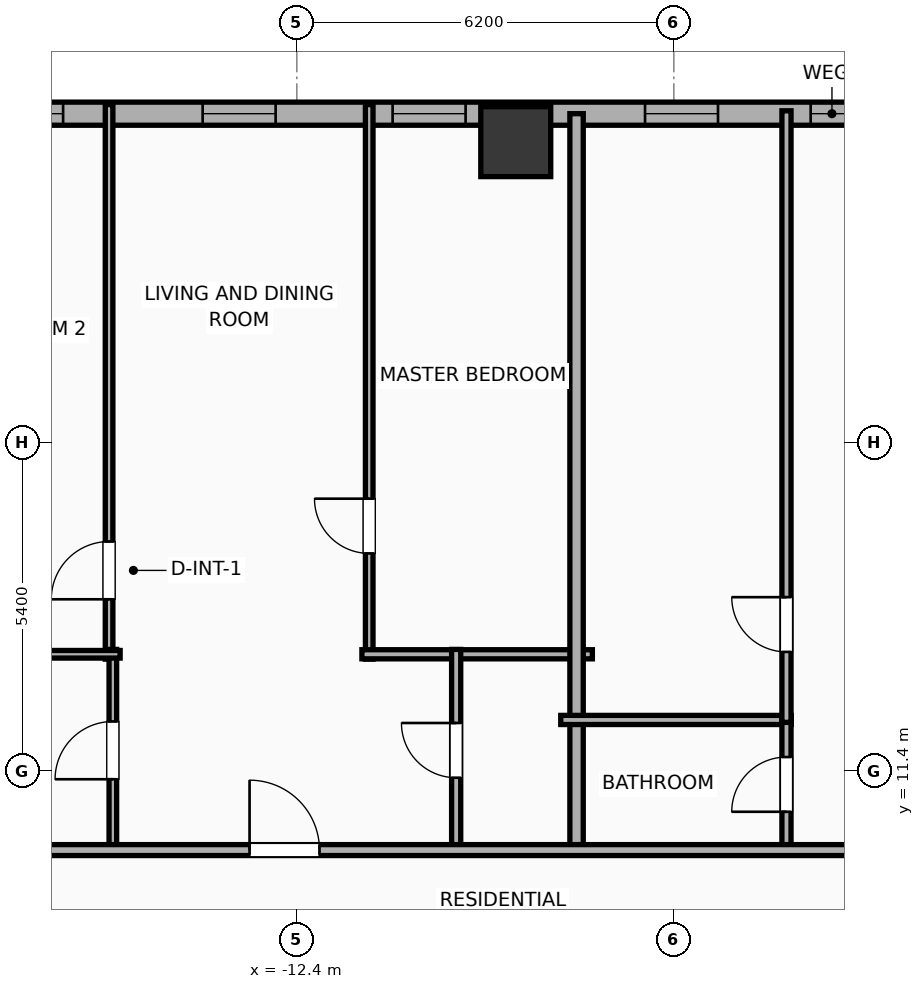
"""IFC4 building model, lengths in metres.
Left out: names, types, materials, properties, quantities, classifications, styles, units other than length and angle.
Written with IfcOpenShell. Run it as: python <this file> out.ifc"""

import sys

from ifc_helpers import new_model, si_unit, direction, frame, frame_2d, origin, origin_2d, place, context, subcontext, project, spatial, rectangle, hollow_rectangle, extrude, element, fill, save


model = new_model("IFC4")
c1 = context("Model", 3, precision=1e-05, world=origin(), true_north=direction((0.0, 1.0)))
c2 = subcontext(c1, "Body", "Model", "MODEL_VIEW")
j1 = project(units=[si_unit("LENGTHUNIT", "METRE"), si_unit("PLANEANGLEUNIT", "RADIAN")], contexts=[c1])
p1 = place(None, origin())
s1 = spatial("IfcSite", under=j1, at=p1, CompositionType="ELEMENT")
p2 = place(p1, origin())
s2 = spatial("IfcBuilding", under=s1, at=p2, CompositionType="ELEMENT")
p3 = place(p2, frame((0.0, 0.0, 45.5)))
s3 = spatial("IfcBuildingStorey", under=s2, at=p3, CompositionType="ELEMENT", Elevation=45.5)
p4 = place(p3, frame((-8.8, 21.75, 0.0), z_axis=(0.0, 0.0, 1.0), x_axis=(1.0, 0.0, 0.0)))
e1 = element("IfcColumn", 1, at=p4, inside=s3, PredefinedType="COLUMN", context=c2, shape_type="SweptSolid", body=[
    extrude(hollow_rectangle(XDim=1.15, YDim=1.15, WallThickness=0.04, at=origin_2d()), origin(), (0.0, 0.0, 1.0), 3.9),
])
p5 = place(p3, frame((-29.581, 22.21, 0.0), z_axis=(0.0, 0.0, 1.0), x_axis=(1.0, 0.0, 0.0)))
e2 = element("IfcWall", 2, at=p5, inside=s3, PredefinedType="ELEMENTEDWALL", context=c2, shape_type="SweptSolid", body=[
    extrude(rectangle(XDim=51.963, YDim=0.38, at=frame_2d((25.981, 0.0))), origin(), (0.0, 0.0, 1.0), 3.65),
])
p6 = place(p5, frame((25.631, 0.0, 0.75)))
e3 = element("IfcOpeningElement", 3, at=p6, cuts=e2, PredefinedType="OPENING", context=c2, shape_type="SweptSolid", body=[
    extrude(rectangle(XDim=2.4, YDim=2.1, at=frame_2d((1.2, 1.05))), frame((0.0, 0.2, 0.0), z_axis=(0.0, -1.0, 0.0), x_axis=(1.0, 0.0, 0.0)), (0.0, 0.0, 1.0), 0.4),
])
p7 = place(p5, frame((42.952, 0.0, 0.75)))
e4 = element("IfcOpeningElement", 4, at=p7, cuts=e2, PredefinedType="OPENING", context=c2, shape_type="SweptSolid", body=[
    extrude(rectangle(XDim=2.4, YDim=2.1, at=frame_2d((1.2, 1.05))), frame((0.0, 0.2, 0.0), z_axis=(0.0, -1.0, 0.0), x_axis=(1.0, 0.0, 0.0)), (0.0, 0.0, 1.0), 0.4),
])
p8 = place(p5, frame((1.731, 0.0, 0.75)))
e5 = element("IfcOpeningElement", 5, at=p8, cuts=e2, PredefinedType="OPENING", context=c2, shape_type="SweptSolid", body=[
    extrude(rectangle(XDim=1.2, YDim=2.05, at=frame_2d((0.6, 1.025))), frame((0.0, 0.2, 0.0), z_axis=(0.0, -1.0, 0.0), x_axis=(1.0, 0.0, 0.0)), (0.0, 0.0, 1.0), 0.4),
])
p9 = place(p5, frame((5.272, 0.0, 0.75)))
e6 = element("IfcOpeningElement", 6, at=p9, cuts=e2, PredefinedType="OPENING", context=c2, shape_type="SweptSolid", body=[
    extrude(rectangle(XDim=1.2, YDim=2.05, at=frame_2d((0.6, 1.025))), frame((0.0, 0.2, 0.0), z_axis=(0.0, -1.0, 0.0), x_axis=(1.0, 0.0, 0.0)), (0.0, 0.0, 1.0), 0.4),
])
p10 = place(p5, frame((8.356, 0.0, 0.75)))
e7 = element("IfcOpeningElement", 7, at=p10, cuts=e2, PredefinedType="OPENING", context=c2, shape_type="SweptSolid", body=[
    extrude(rectangle(XDim=1.2, YDim=2.05, at=frame_2d((0.6, 1.025))), frame((0.0, 0.2, 0.0), z_axis=(0.0, -1.0, 0.0), x_axis=(1.0, 0.0, 0.0)), (0.0, 0.0, 1.0), 0.4),
])
p11 = place(p5, frame((15.632, 0.0, 0.75)))
e8 = element("IfcOpeningElement", 8, at=p11, cuts=e2, PredefinedType="OPENING", context=c2, shape_type="SweptSolid", body=[
    extrude(rectangle(XDim=1.2, YDim=2.05, at=frame_2d((0.6, 1.025))), frame((0.0, 0.2, 0.0), z_axis=(0.0, -1.0, 0.0), x_axis=(1.0, 0.0, 0.0)), (0.0, 0.0, 1.0), 0.4),
])
p12 = place(p5, frame((12.137, 0.0, 0.75)))
e9 = element("IfcOpeningElement", 9, at=p12, cuts=e2, PredefinedType="OPENING", context=c2, shape_type="SweptSolid", body=[
    extrude(rectangle(XDim=1.2, YDim=2.05, at=frame_2d((0.6, 1.025))), frame((0.0, 0.2, 0.0), z_axis=(0.0, -1.0, 0.0), x_axis=(1.0, 0.0, 0.0)), (0.0, 0.0, 1.0), 0.4),
])
p13 = place(p5, frame((18.756, 0.0, 0.75)))
e10 = element("IfcOpeningElement", 10, at=p13, cuts=e2, PredefinedType="OPENING", context=c2, shape_type="SweptSolid", body=[
    extrude(rectangle(XDim=1.2, YDim=2.05, at=frame_2d((0.6, 1.025))), frame((0.0, 0.2, 0.0), z_axis=(0.0, -1.0, 0.0), x_axis=(1.0, 0.0, 0.0)), (0.0, 0.0, 1.0), 0.4),
])
p14 = place(p5, frame((22.907, 0.0, 0.75)))
e11 = element("IfcOpeningElement", 11, at=p14, cuts=e2, PredefinedType="OPENING", context=c2, shape_type="SweptSolid", body=[
    extrude(rectangle(XDim=1.2, YDim=2.05, at=frame_2d((0.6, 1.025))), frame((0.0, 0.2, 0.0), z_axis=(0.0, -1.0, 0.0), x_axis=(1.0, 0.0, 0.0)), (0.0, 0.0, 1.0), 0.4),
])
p15 = place(p5, frame((36.381, 0.0, 0.75)))
e12 = element("IfcOpeningElement", 12, at=p15, cuts=e2, PredefinedType="OPENING", context=c2, shape_type="SweptSolid", body=[
    extrude(rectangle(XDim=1.2, YDim=2.05, at=frame_2d((0.6, 1.025))), frame((0.0, 0.2, 0.0), z_axis=(0.0, -1.0, 0.0), x_axis=(1.0, 0.0, 0.0)), (0.0, 0.0, 1.0), 0.4),
])
p16 = place(p5, frame((32.886, 0.0, 0.75)))
e13 = element("IfcOpeningElement", 13, at=p16, cuts=e2, PredefinedType="OPENING", context=c2, shape_type="SweptSolid", body=[
    extrude(rectangle(XDim=1.2, YDim=2.05, at=frame_2d((0.6, 1.025))), frame((0.0, 0.2, 0.0), z_axis=(0.0, -1.0, 0.0), x_axis=(1.0, 0.0, 0.0)), (0.0, 0.0, 1.0), 0.4),
])
p17 = place(p5, frame((39.556, 0.0, 0.75)))
e14 = element("IfcOpeningElement", 14, at=p17, cuts=e2, PredefinedType="OPENING", context=c2, shape_type="SweptSolid", body=[
    extrude(rectangle(XDim=1.2, YDim=2.05, at=frame_2d((0.6, 1.025))), frame((0.0, 0.2, 0.0), z_axis=(0.0, -1.0, 0.0), x_axis=(1.0, 0.0, 0.0)), (0.0, 0.0, 1.0), 0.4),
])
p18 = place(p5, frame((46.885, 0.0, 0.75)))
e15 = element("IfcOpeningElement", 15, at=p18, cuts=e2, PredefinedType="OPENING", context=c2, shape_type="SweptSolid", body=[
    extrude(rectangle(XDim=1.2, YDim=2.05, at=frame_2d((0.6, 1.025))), frame((0.0, 0.2, 0.0), z_axis=(0.0, -1.0, 0.0), x_axis=(1.0, 0.0, 0.0)), (0.0, 0.0, 1.0), 0.4),
])
p19 = place(p5, frame((49.531, 0.0, 0.75)))
e16 = element("IfcOpeningElement", 16, at=p19, cuts=e2, PredefinedType="OPENING", context=c2, shape_type="SweptSolid", body=[
    extrude(rectangle(XDim=1.2, YDim=2.05, at=frame_2d((0.6, 1.025))), frame((0.0, 0.2, 0.0), z_axis=(0.0, -1.0, 0.0), x_axis=(1.0, 0.0, 0.0)), (0.0, 0.0, 1.0), 0.4),
])
p20 = place(p3, frame((-15.488, 13.24, 0.0), z_axis=(0.0, 0.0, 1.0), x_axis=(0.0, 1.0, 0.0)))
e17 = element("IfcWall", 17, at=p20, inside=s3, PredefinedType="PARTITIONING", context=c2, shape_type="SweptSolid", body=[
    extrude(rectangle(XDim=9.12, YDim=0.125, at=frame_2d((4.56, 0.0))), origin(), (0.0, 0.0, 1.0), 3.65),
])
p21 = place(p20, frame((0.984, 0.0, 0.0)))
e18 = element("IfcOpeningElement", 18, at=p21, cuts=e17, PredefinedType="OPENING", context=c2, shape_type="SweptSolid", body=[
    extrude(rectangle(XDim=0.95, YDim=2.05, at=frame_2d((0.475, 1.025))), frame((0.0, 0.073, 0.0), z_axis=(0.0, -1.0, 0.0), x_axis=(1.0, 0.0, 0.0)), (0.0, 0.0, 1.0), 0.145),
])
p22 = place(p3, frame((-11.21, 13.24, 0.0), z_axis=(0.0, 0.0, 1.0), x_axis=(0.0, 1.0, 0.0)))
e19 = element("IfcWall", 19, at=p22, inside=s3, PredefinedType="PARTITIONING", context=c2, shape_type="SweptSolid", body=[
    extrude(rectangle(XDim=9.12, YDim=0.125, at=frame_2d((4.56, 0.0))), origin(), (0.0, 0.0, 1.0), 3.65),
])
p23 = place(p22, frame((1.739, 0.0, 0.0)))
e20 = element("IfcOpeningElement", 20, at=p23, cuts=e19, PredefinedType="OPENING", context=c2, shape_type="SweptSolid", body=[
    extrude(rectangle(XDim=0.9, YDim=2.05, at=frame_2d((0.45, 1.025))), frame((0.0, 0.073, 0.0), z_axis=(0.0, -1.0, 0.0), x_axis=(1.0, 0.0, 0.0)), (0.0, 0.0, 1.0), 0.145),
])
p24 = place(p3, frame((-11.33, 13.32, 0.0), z_axis=(0.0, 0.0, 1.0), x_axis=(1.0, 0.0, 0.0)))
e21 = element("IfcWall", 21, at=p24, inside=s3, PredefinedType="PLUMBINGWALL", context=c2, shape_type="SweptSolid", body=[
    extrude(rectangle(XDim=3.79, YDim=0.15, at=frame_2d((1.895, 0.0))), origin(), (0.0, 0.0, 1.0), 3.65),
])
p25 = place(p3, frame((-15.426, 10.08, 0.0), z_axis=(0.0, 0.0, 1.0), x_axis=(0.0, 1.0, 0.0)))
e22 = element("IfcWall", 22, at=p25, inside=s3, PredefinedType="PARTITIONING", context=c2, shape_type="SweptSolid", body=[
    extrude(rectangle(XDim=3.32, YDim=0.125, at=frame_2d((1.66, 0.0))), origin(), (0.0, 0.0, 1.0), 3.65),
])
p26 = place(p25, frame((1.185, 0.0, 0.0)))
e23 = element("IfcOpeningElement", 23, at=p26, cuts=e22, PredefinedType="OPENING", context=c2, shape_type="SweptSolid", body=[
    extrude(rectangle(XDim=0.95, YDim=2.05, at=frame_2d((0.475, 1.025))), frame((0.0, 0.073, 0.0), z_axis=(0.0, -1.0, 0.0), x_axis=(1.0, 0.0, 0.0)), (0.0, 0.0, 1.0), 0.145),
])
p27 = place(p3, frame((-18.275, 13.32, 0.0), z_axis=(0.0, 0.0, 1.0), x_axis=(1.0, 0.0, 0.0)))
e24 = element("IfcWall", 24, at=p27, inside=s3, PredefinedType="PARTITIONING", context=c2, shape_type="SweptSolid", body=[
    extrude(rectangle(XDim=2.969, YDim=0.125, at=frame_2d((1.484, 0.0))), origin(), (0.0, 0.0, 1.0), 3.65),
])
p28 = place(p3, frame((-9.78, 10.08, 0.0), z_axis=(0.0, 0.0, 1.0), x_axis=(0.0, 1.0, 0.0)))
e25 = element("IfcWall", 25, at=p28, inside=s3, PredefinedType="PLUMBINGWALL", context=c2, shape_type="SweptSolid", body=[
    extrude(rectangle(XDim=3.32, YDim=0.15, at=frame_2d((1.66, 0.0))), origin(), (0.0, 0.0, 1.0), 3.65),
])
p29 = place(p28, frame((1.21, 0.0, 0.0)))
e26 = element("IfcOpeningElement", 26, at=p29, cuts=e25, PredefinedType="OPENING", context=c2, shape_type="SweptSolid", body=[
    extrude(rectangle(XDim=0.9, YDim=2.05, at=frame_2d((0.45, 1.025))), frame((0.0, 0.085, 0.0), z_axis=(0.0, -1.0, 0.0), x_axis=(1.0, 0.0, 0.0)), (0.0, 0.0, 1.0), 0.17),
])
p30 = place(p3, frame((-7.8, 10.02, 0.0), z_axis=(0.0, 0.0, 1.0), x_axis=(0.0, 1.0, 0.0)))
e27 = element("IfcWall", 27, at=p30, inside=s3, PredefinedType="PARTITIONING", context=c2, shape_type="SweptSolid", body=[
    extrude(rectangle(XDim=12.19, YDim=0.22, at=frame_2d((6.095, 0.0))), origin(), (0.0, 0.0, 1.0), 3.65),
])
p31 = place(p3, frame((-8.06, 12.24, 0.0), z_axis=(0.0, 0.0, 1.0), x_axis=(1.0, 0.0, 0.0)))
e28 = element("IfcWall", 28, at=p31, inside=s3, PredefinedType="PLUMBINGWALL", context=c2, shape_type="SweptSolid", body=[
    extrude(rectangle(XDim=3.792, YDim=0.15, at=frame_2d((1.896, 0.0))), origin(), (0.0, 0.0, 1.0), 3.65),
])
p32 = place(p3, frame((-4.348, 10.08, 0.0), z_axis=(0.0, 0.0, 1.0), x_axis=(0.0, 1.0, 0.0)))
e29 = element("IfcWall", 29, at=p32, inside=s3, PredefinedType="PLUMBINGWALL", context=c2, shape_type="SweptSolid", body=[
    extrude(rectangle(XDim=2.2, YDim=0.15, at=frame_2d((1.1, 0.0))), origin(), (0.0, 0.0, 1.0), 3.65),
])
p33 = place(p32, frame((0.65, 0.0, 0.0)))
e30 = element("IfcOpeningElement", 30, at=p33, cuts=e29, PredefinedType="OPENING", context=c2, shape_type="SweptSolid", body=[
    extrude(rectangle(XDim=0.9, YDim=2.05, at=frame_2d((0.45, 1.025))), frame((0.0, 0.085, 0.0), z_axis=(0.0, -1.0, 0.0), x_axis=(1.0, 0.0, 0.0)), (0.0, 0.0, 1.0), 0.17),
])
p34 = place(p3, frame((-4.348, 12.2, 0.0), z_axis=(0.0, 0.0, 1.0), x_axis=(0.0, 1.0, 0.0)))
e31 = element("IfcWall", 31, at=p34, inside=s3, PredefinedType="PLUMBINGWALL", context=c2, shape_type="SweptSolid", body=[
    extrude(rectangle(XDim=10.058, YDim=0.15, at=frame_2d((5.029, 0.0))), origin(), (0.0, 0.0, 1.0), 3.65),
])
p35 = place(p34, frame((1.159, 0.0, 0.0)))
e32 = element("IfcOpeningElement", 32, at=p35, cuts=e31, PredefinedType="OPENING", context=c2, shape_type="SweptSolid", body=[
    extrude(rectangle(XDim=0.9, YDim=2.05, at=frame_2d((0.45, 1.025))), frame((0.0, 0.085, 0.0), z_axis=(0.0, -1.0, 0.0), x_axis=(1.0, 0.0, 0.0)), (0.0, 0.0, 1.0), 0.17),
])
p36 = place(p3, frame((-33.41, 10.1, 0.0), z_axis=(0.0, 0.0, 1.0), x_axis=(1.0, 0.0, 0.0)))
e33 = element("IfcWall", 33, at=p36, inside=s3, PredefinedType="PARTITIONING", context=c2, shape_type="SweptSolid", body=[
    extrude(rectangle(XDim=59.62, YDim=0.18, at=frame_2d((29.81, 0.0))), origin(), (0.0, 0.0, 1.0), 3.65),
])
p37 = place(p36, frame((3.354, 0.0, 0.0)))
e34 = element("IfcOpeningElement", 34, at=p37, cuts=e33, PredefinedType="OPENING", context=c2, shape_type="SweptSolid", body=[
    extrude(rectangle(XDim=1.15, YDim=2.05, at=frame_2d((0.575, 1.025))), frame((0.0, 0.1, 0.0), z_axis=(0.0, -1.0, 0.0), x_axis=(1.0, 0.0, 0.0)), (0.0, 0.0, 1.0), 0.2),
])
p38 = place(p36, frame((10.997, 0.0, 0.0)))
e35 = element("IfcOpeningElement", 35, at=p38, cuts=e33, PredefinedType="OPENING", context=c2, shape_type="SweptSolid", body=[
    extrude(rectangle(XDim=1.15, YDim=2.05, at=frame_2d((0.575, 1.025))), frame((0.0, 0.1, 0.0), z_axis=(0.0, -1.0, 0.0), x_axis=(1.0, 0.0, 0.0)), (0.0, 0.0, 1.0), 0.2),
])
p39 = place(p36, frame((20.232, 0.0, 0.0)))
e36 = element("IfcOpeningElement", 36, at=p39, cuts=e33, PredefinedType="OPENING", context=c2, shape_type="SweptSolid", body=[
    extrude(rectangle(XDim=1.15, YDim=2.05, at=frame_2d((0.575, 1.025))), frame((0.0, 0.1, 0.0), z_axis=(0.0, -1.0, 0.0), x_axis=(1.0, 0.0, 0.0)), (0.0, 0.0, 1.0), 0.2),
])
p40 = place(p36, frame((30.38, 0.0, 0.0)))
e37 = element("IfcOpeningElement", 37, at=p40, cuts=e33, PredefinedType="OPENING", context=c2, shape_type="SweptSolid", body=[
    extrude(rectangle(XDim=1.15, YDim=2.05, at=frame_2d((0.575, 1.025))), frame((0.0, 0.1, 0.0), z_axis=(0.0, -1.0, 0.0), x_axis=(1.0, 0.0, 0.0)), (0.0, 0.0, 1.0), 0.2),
])
p41 = place(p36, frame((40.998, 0.0, 0.0)))
e38 = element("IfcOpeningElement", 38, at=p41, cuts=e33, PredefinedType="OPENING", context=c2, shape_type="SweptSolid", body=[
    extrude(rectangle(XDim=1.15, YDim=2.05, at=frame_2d((0.575, 1.025))), frame((0.0, 0.1, 0.0), z_axis=(0.0, -1.0, 0.0), x_axis=(1.0, 0.0, 0.0)), (0.0, 0.0, 1.0), 0.2),
])
p42 = place(p36, frame((49.428, 0.0, 0.0)))
e39 = element("IfcOpeningElement", 39, at=p42, cuts=e33, PredefinedType="OPENING", context=c2, shape_type="SweptSolid", body=[
    extrude(rectangle(XDim=0.9, YDim=2.05, at=frame_2d((0.45, 1.025))), frame((0.0, 0.1, 0.0), z_axis=(0.0, -1.0, 0.0), x_axis=(1.0, 0.0, 0.0)), (0.0, 0.0, 1.0), 0.2),
])
p43 = place(p36, frame((56.07, 0.0, 0.0)))
e40 = element("IfcOpeningElement", 40, at=p43, cuts=e33, PredefinedType="OPENING", context=c2, shape_type="SweptSolid", body=[
    extrude(rectangle(XDim=0.9, YDim=2.05, at=frame_2d((0.45, 1.025))), frame((0.0, 0.1, 0.0), z_axis=(0.0, -1.0, 0.0), x_axis=(1.0, 0.0, 0.0)), (0.0, 0.0, 1.0), 0.2),
])
p44 = place(p6, origin())
e41 = element("IfcWindow", 41, at=p44, inside=s3, PartitioningType="SINGLE_PANEL", PredefinedType="WINDOW", context=c2, shape_type="SweptSolid", body=[
    extrude(rectangle(XDim=2.4, YDim=2.1, at=frame_2d((1.2, 1.05))), frame((0.0, 0.03, 0.0), z_axis=(0.0, -1.0, 0.0), x_axis=(1.0, 0.0, 0.0)), (0.0, 0.0, 1.0), 0.06),
])
fill(e3, e41)
p45 = place(p11, origin())
e42 = element("IfcWindow", 42, at=p45, inside=s3, PartitioningType="SINGLE_PANEL", PredefinedType="WINDOW", context=c2, shape_type="SweptSolid", body=[
    extrude(rectangle(XDim=1.2, YDim=2.05, at=frame_2d((0.6, 1.025))), frame((0.0, 0.03, 0.0), z_axis=(0.0, -1.0, 0.0), x_axis=(1.0, 0.0, 0.0)), (0.0, 0.0, 1.0), 0.06),
])
fill(e8, e42)
p46 = place(p12, origin())
e43 = element("IfcWindow", 43, at=p46, inside=s3, PartitioningType="SINGLE_PANEL", PredefinedType="WINDOW", context=c2, shape_type="SweptSolid", body=[
    extrude(rectangle(XDim=1.2, YDim=2.05, at=frame_2d((0.6, 1.025))), frame((0.0, 0.03, 0.0), z_axis=(0.0, -1.0, 0.0), x_axis=(1.0, 0.0, 0.0)), (0.0, 0.0, 1.0), 0.06),
])
fill(e9, e43)
p47 = place(p13, origin())
e44 = element("IfcWindow", 44, at=p47, inside=s3, PartitioningType="SINGLE_PANEL", PredefinedType="WINDOW", context=c2, shape_type="SweptSolid", body=[
    extrude(rectangle(XDim=1.2, YDim=2.05, at=frame_2d((0.6, 1.025))), frame((0.0, 0.03, 0.0), z_axis=(0.0, -1.0, 0.0), x_axis=(1.0, 0.0, 0.0)), (0.0, 0.0, 1.0), 0.06),
])
fill(e10, e44)
p48 = place(p14, origin())
e45 = element("IfcWindow", 45, at=p48, inside=s3, PartitioningType="SINGLE_PANEL", PredefinedType="WINDOW", context=c2, shape_type="SweptSolid", body=[
    extrude(rectangle(XDim=1.2, YDim=2.05, at=frame_2d((0.6, 1.025))), frame((0.0, 0.03, 0.0), z_axis=(0.0, -1.0, 0.0), x_axis=(1.0, 0.0, 0.0)), (0.0, 0.0, 1.0), 0.06),
])
fill(e11, e45)
p49 = place(p21, origin())
e46 = element("IfcDoor", 46, at=p49, inside=s3, OperationType="SINGLE_SWING_LEFT", PredefinedType="DOOR", context=c2, shape_type="SweptSolid", body=[
    extrude(rectangle(XDim=0.95, YDim=2.05, at=frame_2d((0.475, 1.025))), frame((0.0, 0.025, 0.0), z_axis=(0.0, -1.0, 0.0), x_axis=(1.0, 0.0, 0.0)), (0.0, 0.0, 1.0), 0.05),
])
fill(e18, e46)
p50 = place(p23, origin())
e47 = element("IfcDoor", 47, at=p50, inside=s3, OperationType="SINGLE_SWING_RIGHT", PredefinedType="DOOR", context=c2, shape_type="SweptSolid", body=[
    extrude(rectangle(XDim=0.9, YDim=2.05, at=frame_2d((0.45, 1.025))), frame((0.0, 0.025, 0.0), z_axis=(0.0, -1.0, 0.0), x_axis=(1.0, 0.0, 0.0)), (0.0, 0.0, 1.0), 0.05),
])
fill(e20, e47)
p51 = place(p26, origin())
e48 = element("IfcDoor", 48, at=p51, inside=s3, OperationType="SINGLE_SWING_LEFT", PredefinedType="DOOR", context=c2, shape_type="SweptSolid", body=[
    extrude(rectangle(XDim=0.95, YDim=2.05, at=frame_2d((0.475, 1.025))), frame((0.0, 0.025, 0.0), z_axis=(0.0, -1.0, 0.0), x_axis=(1.0, 0.0, 0.0)), (0.0, 0.0, 1.0), 0.05),
])
fill(e23, e48)
p52 = place(p29, origin())
e49 = element("IfcDoor", 49, at=p52, inside=s3, OperationType="SINGLE_SWING_RIGHT", PredefinedType="DOOR", context=c2, shape_type="SweptSolid", body=[
    extrude(rectangle(XDim=0.9, YDim=2.05, at=frame_2d((0.45, 1.025))), frame((0.0, 0.025, 0.0), z_axis=(0.0, -1.0, 0.0), x_axis=(1.0, 0.0, 0.0)), (0.0, 0.0, 1.0), 0.05),
])
fill(e26, e49)
p53 = place(p33, origin())
e50 = element("IfcDoor", 50, at=p53, inside=s3, OperationType="SINGLE_SWING_LEFT", PredefinedType="DOOR", context=c2, shape_type="SweptSolid", body=[
    extrude(rectangle(XDim=0.9, YDim=2.05, at=frame_2d((0.45, 1.025))), frame((0.0, 0.025, 0.0), z_axis=(0.0, -1.0, 0.0), x_axis=(1.0, 0.0, 0.0)), (0.0, 0.0, 1.0), 0.05),
])
fill(e30, e50)
p54 = place(p35, origin())
e51 = element("IfcDoor", 51, at=p54, inside=s3, OperationType="SINGLE_SWING_RIGHT", PredefinedType="DOOR", context=c2, shape_type="SweptSolid", body=[
    extrude(rectangle(XDim=0.9, YDim=2.05, at=frame_2d((0.45, 1.025))), frame((0.0, 0.025, 0.0), z_axis=(0.0, -1.0, 0.0), x_axis=(1.0, 0.0, 0.0)), (0.0, 0.0, 1.0), 0.05),
])
fill(e32, e51)
p55 = place(p39, origin())
e52 = element("IfcDoor", 52, at=p55, inside=s3, OperationType="SINGLE_SWING_LEFT", PredefinedType="DOOR", context=c2, shape_type="SweptSolid", body=[
    extrude(rectangle(XDim=1.15, YDim=2.05, at=frame_2d((0.575, 1.025))), frame((0.0, 0.025, 0.0), z_axis=(0.0, -1.0, 0.0), x_axis=(1.0, 0.0, 0.0)), (0.0, 0.0, 1.0), 0.05),
])
fill(e36, e52)
save(model, sys.argv[1])
